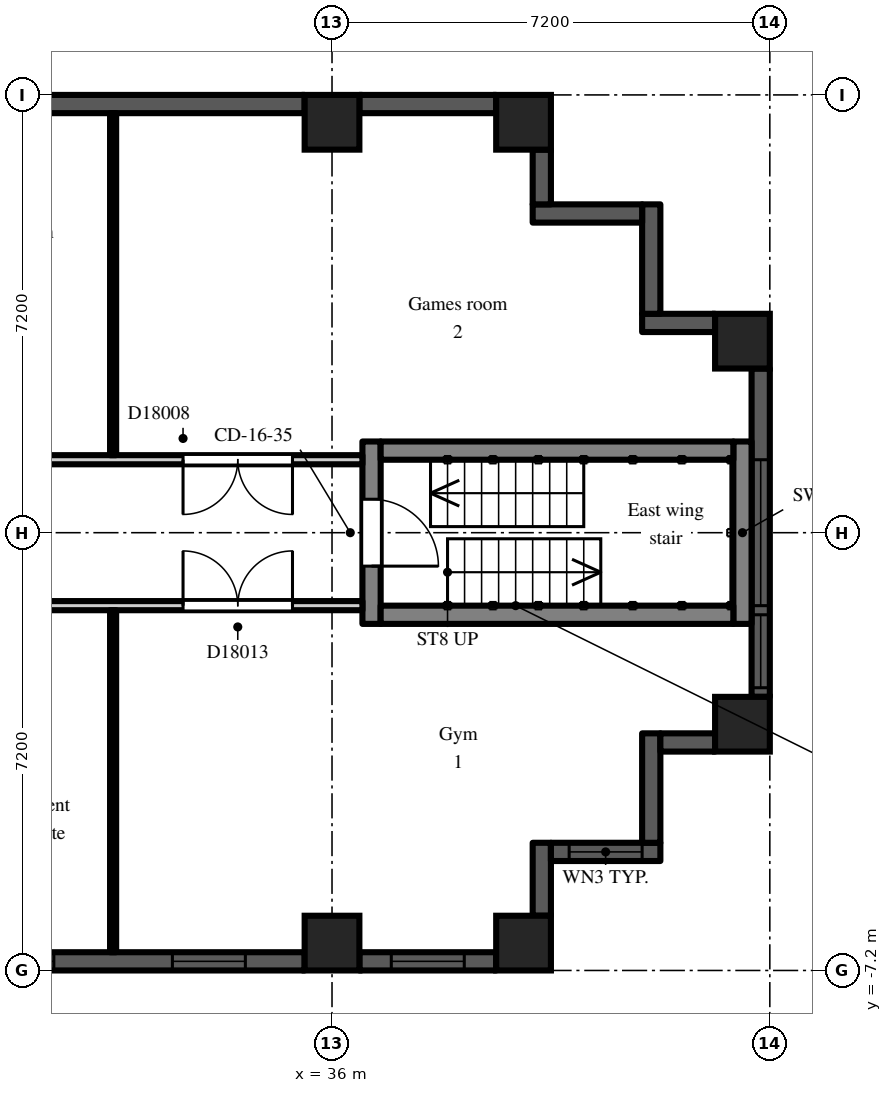
"""IFC4 building model, lengths in metres.
Left out: names, types, materials, properties, quantities, classifications, styles, units other than length and angle.
Written with IfcOpenShell. Run it as: python <this file> out.ifc"""

import sys

from ifc_helpers import new_model, si_unit, direction, frame, frame_2d, origin, origin_2d, place, context, subcontext, project, spatial, rectangle, extrude, element, fill, save


model = new_model("IFC4")
c1 = context("Model", 3, precision=1e-05, world=origin(), true_north=direction((0.0, 1.0)))
c2 = subcontext(c1, "Body", "Model", "MODEL_VIEW")
j1 = project(units=[si_unit("LENGTHUNIT", "METRE"), si_unit("PLANEANGLEUNIT", "RADIAN")], contexts=[c1])
p1 = place(None, origin())
s1 = spatial("IfcSite", under=j1, at=p1, CompositionType="ELEMENT")
p2 = place(p1, origin())
s2 = spatial("IfcBuilding", under=s1, at=p2, CompositionType="ELEMENT")
p3 = place(p2, frame((0.0, 0.0, 123.3)))
s3 = spatial("IfcBuildingStorey", under=s2, at=p3, CompositionType="ELEMENT", Elevation=123.3)
for number, where, z_axis, x_axis in (
    (1, (36.0, -6.75, 0.0), (0.0, 0.0, 1.0), (1.0, 0.0, 0.0)),
    (2, (36.0, 6.75, 0.0), (0.0, 0.0, 1.0), (1.0, 0.0, 0.0)),
    (3, (39.15, -6.75, 0.0), (0.0, 0.0, 1.0), (1.0, 0.0, 0.0)),
    (4, (39.15, 6.75, 0.0), (0.0, 0.0, 1.0), (1.0, 0.0, 0.0)),
    (5, (42.75, -3.15, 0.0), (0.0, 0.0, 1.0), (1.0, 0.0, 0.0)),
    (6, (42.75, 3.15, 0.0), (0.0, 0.0, 1.0), (1.0, 0.0, 0.0)),
):
    element("IfcColumn", number, at=place(p3, frame(where, z_axis=z_axis, x_axis=x_axis)), inside=s3, PredefinedType="COLUMN", context=c2, shape_type="SweptSolid", body=[
        extrude(rectangle(XDim=0.9, YDim=0.9, at=origin_2d()), origin(), (0.0, 0.0, 1.0), 3.0),
    ])
p4 = place(p3, frame((29.25, -7.05, 0.0), z_axis=(0.0, 0.0, 1.0), x_axis=(1.0, 0.0, 0.0)))
e7 = element("IfcWall", 7, at=p4, inside=s3, PredefinedType="SOLIDWALL", context=c2, shape_type="SweptSolid", body=[
    extrude(rectangle(XDim=6.3, YDim=0.3, at=frame_2d((3.15, 0.0))), origin(), (0.0, 0.0, 1.0), 2.2),
])
p5 = place(p4, frame((0.975, 0.0, 0.2)))
e8 = element("IfcOpeningElement", 8, at=p5, cuts=e7, PredefinedType="OPENING", context=c2, shape_type="SweptSolid", body=[
    extrude(rectangle(XDim=1.2, YDim=1.85, at=frame_2d((0.6, 0.925))), frame((0.0, 0.16, 0.0), z_axis=(0.0, -1.0, 0.0), x_axis=(1.0, 0.0, 0.0)), (0.0, 0.0, 1.0), 0.32),
])
p6 = place(p4, frame((4.125, 0.0, 0.2)))
e9 = element("IfcOpeningElement", 9, at=p6, cuts=e7, PredefinedType="OPENING", context=c2, shape_type="SweptSolid", body=[
    extrude(rectangle(XDim=1.2, YDim=1.85, at=frame_2d((0.6, 0.925))), frame((0.0, 0.16, 0.0), z_axis=(0.0, -1.0, 0.0), x_axis=(1.0, 0.0, 0.0)), (0.0, 0.0, 1.0), 0.32),
])
p7 = place(p3, frame((36.45, -7.05, 0.0), z_axis=(0.0, 0.0, 1.0), x_axis=(1.0, 0.0, 0.0)))
e10 = element("IfcWall", 10, at=p7, inside=s3, PredefinedType="SOLIDWALL", context=c2, shape_type="SweptSolid", body=[
    extrude(rectangle(XDim=2.25, YDim=0.3, at=frame_2d((1.125, 0.0))), origin(), (0.0, 0.0, 1.0), 2.2),
])
p8 = place(p7, frame((0.525, 0.0, 0.2)))
e11 = element("IfcOpeningElement", 11, at=p8, cuts=e10, PredefinedType="OPENING", context=c2, shape_type="SweptSolid", body=[
    extrude(rectangle(XDim=1.2, YDim=1.85, at=frame_2d((0.6, 0.925))), frame((0.0, 0.16, 0.0), z_axis=(0.0, -1.0, 0.0), x_axis=(1.0, 0.0, 0.0)), (0.0, 0.0, 1.0), 0.32),
])
p9 = place(p3, frame((39.45, -6.3, 0.0), z_axis=(0.0, 0.0, 1.0), x_axis=(0.0, 1.0, 0.0)))
e12 = element("IfcWall", 12, at=p9, inside=s3, PredefinedType="SOLIDWALL", context=c2, shape_type="SweptSolid", body=[
    extrude(rectangle(XDim=1.2, YDim=0.3, at=frame_2d((0.6, 0.0))), origin(), (0.0, 0.0, 1.0), 2.6),
])
p10 = place(p3, frame((39.6, -5.25, 0.0), z_axis=(0.0, 0.0, 1.0), x_axis=(1.0, 0.0, 0.0)))
e13 = element("IfcWall", 13, at=p10, inside=s3, PredefinedType="SOLIDWALL", context=c2, shape_type="SweptSolid", body=[
    extrude(rectangle(XDim=1.8, YDim=0.3, at=frame_2d((0.9, 0.0))), origin(), (0.0, 0.0, 1.0), 2.6),
])
p11 = place(p10, frame((0.3, 0.0, 0.2)))
e14 = element("IfcOpeningElement", 14, at=p11, cuts=e13, PredefinedType="OPENING", context=c2, shape_type="SweptSolid", body=[
    extrude(rectangle(XDim=1.2, YDim=1.85, at=frame_2d((0.6, 0.925))), frame((0.0, 0.16, 0.0), z_axis=(0.0, -1.0, 0.0), x_axis=(1.0, 0.0, 0.0)), (0.0, 0.0, 1.0), 0.32),
])
p12 = place(p3, frame((41.25, -5.1, 0.0), z_axis=(0.0, 0.0, 1.0), x_axis=(0.0, 1.0, 0.0)))
e15 = element("IfcWall", 15, at=p12, inside=s3, PredefinedType="SOLIDWALL", context=c2, shape_type="SweptSolid", body=[
    extrude(rectangle(XDim=1.8, YDim=0.3, at=frame_2d((0.9, 0.0))), origin(), (0.0, 0.0, 1.0), 2.6),
])
p13 = place(p3, frame((41.4, -3.45, 0.0), z_axis=(0.0, 0.0, 1.0), x_axis=(1.0, 0.0, 0.0)))
e16 = element("IfcWall", 16, at=p13, inside=s3, PredefinedType="SOLIDWALL", context=c2, shape_type="SweptSolid", body=[
    extrude(rectangle(XDim=0.9, YDim=0.3, at=frame_2d((0.45, 0.0))), origin(), (0.0, 0.0, 1.0), 2.6),
])
p14 = place(p3, frame((43.05, -2.7, 0.0), z_axis=(0.0, 0.0, 1.0), x_axis=(0.0, 1.0, 0.0)))
e17 = element("IfcWall", 17, at=p14, inside=s3, PredefinedType="SOLIDWALL", context=c2, shape_type="SweptSolid", body=[
    extrude(rectangle(XDim=5.4, YDim=0.3, at=frame_2d((2.7, 0.0))), origin(), (0.0, 0.0, 1.0), 2.2),
])
p15 = place(p14, frame((1.5, 0.0, 0.2)))
e18 = element("IfcOpeningElement", 18, at=p15, cuts=e17, PredefinedType="OPENING", context=c2, shape_type="SweptSolid", body=[
    extrude(rectangle(XDim=2.4, YDim=1.85, at=frame_2d((1.2, 0.925))), frame((0.0, 0.16, 0.0), z_axis=(0.0, -1.0, 0.0), x_axis=(1.0, 0.0, 0.0)), (0.0, 0.0, 1.0), 0.32),
])
p16 = place(p14, frame((0.15, 0.0, 0.2)))
e19 = element("IfcOpeningElement", 19, at=p16, cuts=e17, PredefinedType="OPENING", context=c2, shape_type="SweptSolid", body=[
    extrude(rectangle(XDim=1.2, YDim=1.85, at=frame_2d((0.6, 0.925))), frame((0.0, 0.16, 0.0), z_axis=(0.0, -1.0, 0.0), x_axis=(1.0, 0.0, 0.0)), (0.0, 0.0, 1.0), 0.32),
])
p17 = place(p3, frame((42.3, 3.45, 0.0), z_axis=(0.0, 0.0, 1.0), x_axis=(-1.0, 0.0, 0.0)))
e20 = element("IfcWall", 20, at=p17, inside=s3, PredefinedType="SOLIDWALL", context=c2, shape_type="SweptSolid", body=[
    extrude(rectangle(XDim=1.2, YDim=0.3, at=frame_2d((0.6, 0.0))), origin(), (0.0, 0.0, 1.0), 2.6),
])
p18 = place(p3, frame((41.25, 3.6, 0.0), z_axis=(0.0, 0.0, 1.0), x_axis=(0.0, 1.0, 0.0)))
e21 = element("IfcWall", 21, at=p18, inside=s3, PredefinedType="SOLIDWALL", context=c2, shape_type="SweptSolid", body=[
    extrude(rectangle(XDim=1.8, YDim=0.3, at=frame_2d((0.9, 0.0))), origin(), (0.0, 0.0, 1.0), 2.6),
])
p19 = place(p3, frame((41.1, 5.25, 0.0), z_axis=(0.0, 0.0, 1.0), x_axis=(-1.0, 0.0, 0.0)))
e22 = element("IfcWall", 22, at=p19, inside=s3, PredefinedType="SOLIDWALL", context=c2, shape_type="SweptSolid", body=[
    extrude(rectangle(XDim=1.8, YDim=0.3, at=frame_2d((0.9, 0.0))), origin(), (0.0, 0.0, 1.0), 2.6),
])
p20 = place(p3, frame((39.45, 5.4, 0.0), z_axis=(0.0, 0.0, 1.0), x_axis=(0.0, 1.0, 0.0)))
e23 = element("IfcWall", 23, at=p20, inside=s3, PredefinedType="SOLIDWALL", context=c2, shape_type="SweptSolid", body=[
    extrude(rectangle(XDim=0.9, YDim=0.3, at=frame_2d((0.45, 0.0))), origin(), (0.0, 0.0, 1.0), 2.6),
])
p21 = place(p3, frame((38.7, 7.05, 0.0), z_axis=(0.0, 0.0, 1.0), x_axis=(-1.0, 0.0, 0.0)))
e24 = element("IfcWall", 24, at=p21, inside=s3, PredefinedType="SOLIDWALL", context=c2, shape_type="SweptSolid", body=[
    extrude(rectangle(XDim=2.25, YDim=0.3, at=frame_2d((1.125, 0.0))), origin(), (0.0, 0.0, 1.0), 2.2),
])
p22 = place(p3, frame((35.55, 7.05, 0.0), z_axis=(0.0, 0.0, 1.0), x_axis=(-1.0, 0.0, 0.0)))
e25 = element("IfcWall", 25, at=p22, inside=s3, PredefinedType="SOLIDWALL", context=c2, shape_type="SweptSolid", body=[
    extrude(rectangle(XDim=6.3, YDim=0.3, at=frame_2d((3.15, 0.0))), origin(), (0.0, 0.0, 1.0), 2.2),
])
p23 = place(p3, frame((36.65, -1.5, 0.0), z_axis=(0.0, 0.0, 1.0), x_axis=(0.0, 1.0, 0.0)))
e26 = element("IfcWall", 26, at=p23, inside=s3, PredefinedType="SHEAR", context=c2, shape_type="SweptSolid", body=[
    extrude(rectangle(XDim=3.0, YDim=0.3, at=frame_2d((1.5, 0.0))), origin(), (0.0, 0.0, 1.0), 2.6),
])
p24 = place(p23, frame((0.95, 0.0, 0.0)))
e27 = element("IfcOpeningElement", 27, at=p24, cuts=e26, PredefinedType="OPENING", context=c2, shape_type="SweptSolid", body=[
    extrude(rectangle(XDim=1.1, YDim=2.1, at=frame_2d((0.55, 1.05))), frame((0.0, 0.16, 0.0), z_axis=(0.0, -1.0, 0.0), x_axis=(1.0, 0.0, 0.0)), (0.0, 0.0, 1.0), 0.32),
])
p25 = place(p3, frame((42.75, -1.5, 0.0), z_axis=(0.0, 0.0, 1.0), x_axis=(0.0, 1.0, 0.0)))
e28 = element("IfcWall", 28, at=p25, inside=s3, PredefinedType="SHEAR", context=c2, shape_type="SweptSolid", body=[
    extrude(rectangle(XDim=3.0, YDim=0.3, at=frame_2d((1.5, 0.0))), origin(), (0.0, 0.0, 1.0), 2.6),
])
for number, where, z_axis, x_axis in (
    (29, (36.8, -1.35, 0.0), (0.0, 0.0, 1.0), (1.0, 0.0, 0.0)),
    (30, (36.8, 1.35, 0.0), (0.0, 0.0, 1.0), (1.0, 0.0, 0.0)),
):
    element("IfcWall", number, at=place(p3, frame(where, z_axis=z_axis, x_axis=x_axis)), inside=s3, PredefinedType="SHEAR", context=c2, shape_type="SweptSolid", body=[
        extrude(rectangle(XDim=5.8, YDim=0.3, at=frame_2d((2.9, 0.0))), origin(), (0.0, 0.0, 1.0), 2.6),
    ])
p26 = place(p3, frame((21.6, -1.2, 0.0), z_axis=(0.0, 0.0, 1.0), x_axis=(1.0, 0.0, 0.0)))
e31 = element("IfcWall", 31, at=p26, inside=s3, PredefinedType="PARTITIONING", context=c2, shape_type="SweptSolid", body=[
    extrude(rectangle(XDim=14.9, YDim=0.15, at=frame_2d((7.45, 0.0))), origin(), (0.0, 0.0, 1.0), 2.6),
])
p27 = place(p26, frame((0.45, 0.0, 0.0)))
e32 = element("IfcOpeningElement", 32, at=p27, cuts=e31, PredefinedType="OPENING", context=c2, shape_type="SweptSolid", body=[
    extrude(rectangle(XDim=0.9, YDim=2.1, at=frame_2d((0.45, 1.05))), frame((0.0, 0.085, 0.0), z_axis=(0.0, -1.0, 0.0), x_axis=(1.0, 0.0, 0.0)), (0.0, 0.0, 1.0), 0.17),
])
p28 = place(p26, frame((2.25, 0.0, 0.0)))
e33 = element("IfcOpeningElement", 33, at=p28, cuts=e31, PredefinedType="OPENING", context=c2, shape_type="SweptSolid", body=[
    extrude(rectangle(XDim=0.9, YDim=2.1, at=frame_2d((0.45, 1.05))), frame((0.0, 0.085, 0.0), z_axis=(0.0, -1.0, 0.0), x_axis=(1.0, 0.0, 0.0)), (0.0, 0.0, 1.0), 0.17),
])
p29 = place(p26, frame((5.71, 0.0, 0.0)))
e34 = element("IfcOpeningElement", 34, at=p29, cuts=e31, PredefinedType="OPENING", context=c2, shape_type="SweptSolid", body=[
    extrude(rectangle(XDim=1.0, YDim=2.1, at=frame_2d((0.5, 1.05))), frame((0.0, 0.085, 0.0), z_axis=(0.0, -1.0, 0.0), x_axis=(1.0, 0.0, 0.0)), (0.0, 0.0, 1.0), 0.17),
])
p30 = place(p26, frame((11.95, 0.0, 0.0)))
e35 = element("IfcOpeningElement", 35, at=p30, cuts=e31, PredefinedType="OPENING", context=c2, shape_type="SweptSolid", body=[
    extrude(rectangle(XDim=1.8, YDim=2.1, at=frame_2d((0.9, 1.05))), frame((0.0, 0.085, 0.0), z_axis=(0.0, -1.0, 0.0), x_axis=(1.0, 0.0, 0.0)), (0.0, 0.0, 1.0), 0.17),
])
p31 = place(p3, frame((21.6, 1.2, 0.0), z_axis=(0.0, 0.0, 1.0), x_axis=(1.0, 0.0, 0.0)))
e36 = element("IfcWall", 36, at=p31, inside=s3, PredefinedType="PARTITIONING", context=c2, shape_type="SweptSolid", body=[
    extrude(rectangle(XDim=14.9, YDim=0.15, at=frame_2d((7.45, 0.0))), origin(), (0.0, 0.0, 1.0), 2.6),
])
p32 = place(p31, frame((0.45, 0.0, 0.0)))
e37 = element("IfcOpeningElement", 37, at=p32, cuts=e36, PredefinedType="OPENING", context=c2, shape_type="SweptSolid", body=[
    extrude(rectangle(XDim=0.9, YDim=2.1, at=frame_2d((0.45, 1.05))), frame((0.0, 0.085, 0.0), z_axis=(0.0, -1.0, 0.0), x_axis=(1.0, 0.0, 0.0)), (0.0, 0.0, 1.0), 0.17),
])
p33 = place(p31, frame((2.25, 0.0, 0.0)))
e38 = element("IfcOpeningElement", 38, at=p33, cuts=e36, PredefinedType="OPENING", context=c2, shape_type="SweptSolid", body=[
    extrude(rectangle(XDim=0.9, YDim=2.1, at=frame_2d((0.45, 1.05))), frame((0.0, 0.085, 0.0), z_axis=(0.0, -1.0, 0.0), x_axis=(1.0, 0.0, 0.0)), (0.0, 0.0, 1.0), 0.17),
])
p34 = place(p31, frame((6.3, 0.0, 0.0)))
e39 = element("IfcOpeningElement", 39, at=p34, cuts=e36, PredefinedType="OPENING", context=c2, shape_type="SweptSolid", body=[
    extrude(rectangle(XDim=1.8, YDim=2.1, at=frame_2d((0.9, 1.05))), frame((0.0, 0.085, 0.0), z_axis=(0.0, -1.0, 0.0), x_axis=(1.0, 0.0, 0.0)), (0.0, 0.0, 1.0), 0.17),
])
p35 = place(p31, frame((11.95, 0.0, 0.0)))
e40 = element("IfcOpeningElement", 40, at=p35, cuts=e36, PredefinedType="OPENING", context=c2, shape_type="SweptSolid", body=[
    extrude(rectangle(XDim=1.8, YDim=2.1, at=frame_2d((0.9, 1.05))), frame((0.0, 0.085, 0.0), z_axis=(0.0, -1.0, 0.0), x_axis=(1.0, 0.0, 0.0)), (0.0, 0.0, 1.0), 0.17),
])
for number, where, z_axis, x_axis in (
    (41, (32.4, -6.9, 0.0), (0.0, 0.0, 1.0), (0.0, 1.0, 0.0)),
    (42, (32.4, 1.275, 0.0), (0.0, 0.0, 1.0), (0.0, 1.0, 0.0)),
):
    element("IfcWall", number, at=place(p3, frame(where, z_axis=z_axis, x_axis=x_axis)), inside=s3, PredefinedType="PARTITIONING", context=c2, shape_type="SweptSolid", body=[
        extrude(rectangle(XDim=5.625, YDim=0.1, at=frame_2d((2.812, 0.0))), origin(), (0.0, 0.0, 1.0), 2.6),
    ])
p36 = place(p5, origin())
e43 = element("IfcWindow", 43, at=p36, inside=s3, PartitioningType="SINGLE_PANEL", PredefinedType="WINDOW", context=c2, shape_type="SweptSolid", body=[
    extrude(rectangle(XDim=1.2, YDim=1.85, at=frame_2d((0.6, 0.925))), frame((0.0, 0.03, 0.0), z_axis=(0.0, -1.0, 0.0), x_axis=(1.0, 0.0, 0.0)), (0.0, 0.0, 1.0), 0.06),
])
fill(e8, e43)
p37 = place(p6, origin())
e44 = element("IfcWindow", 44, at=p37, inside=s3, PartitioningType="SINGLE_PANEL", PredefinedType="WINDOW", context=c2, shape_type="SweptSolid", body=[
    extrude(rectangle(XDim=1.2, YDim=1.85, at=frame_2d((0.6, 0.925))), frame((0.0, 0.03, 0.0), z_axis=(0.0, -1.0, 0.0), x_axis=(1.0, 0.0, 0.0)), (0.0, 0.0, 1.0), 0.06),
])
fill(e9, e44)
p38 = place(p8, origin())
e45 = element("IfcWindow", 45, at=p38, inside=s3, PartitioningType="SINGLE_PANEL", PredefinedType="WINDOW", context=c2, shape_type="SweptSolid", body=[
    extrude(rectangle(XDim=1.2, YDim=1.85, at=frame_2d((0.6, 0.925))), frame((0.0, 0.03, 0.0), z_axis=(0.0, -1.0, 0.0), x_axis=(1.0, 0.0, 0.0)), (0.0, 0.0, 1.0), 0.06),
])
fill(e11, e45)
p39 = place(p11, origin())
e46 = element("IfcWindow", 46, at=p39, inside=s3, PartitioningType="SINGLE_PANEL", PredefinedType="WINDOW", context=c2, shape_type="SweptSolid", body=[
    extrude(rectangle(XDim=1.2, YDim=1.85, at=frame_2d((0.6, 0.925))), frame((0.0, 0.03, 0.0), z_axis=(0.0, -1.0, 0.0), x_axis=(1.0, 0.0, 0.0)), (0.0, 0.0, 1.0), 0.06),
])
fill(e14, e46)
p40 = place(p15, origin())
e47 = element("IfcWindow", 47, at=p40, inside=s3, PartitioningType="SINGLE_PANEL", PredefinedType="WINDOW", context=c2, shape_type="SweptSolid", body=[
    extrude(rectangle(XDim=2.4, YDim=1.85, at=frame_2d((1.2, 0.925))), frame((0.0, 0.03, 0.0), z_axis=(0.0, -1.0, 0.0), x_axis=(1.0, 0.0, 0.0)), (0.0, 0.0, 1.0), 0.06),
])
fill(e18, e47)
p41 = place(p16, origin())
e48 = element("IfcWindow", 48, at=p41, inside=s3, PartitioningType="SINGLE_PANEL", PredefinedType="WINDOW", context=c2, shape_type="SweptSolid", body=[
    extrude(rectangle(XDim=1.2, YDim=1.85, at=frame_2d((0.6, 0.925))), frame((0.0, 0.03, 0.0), z_axis=(0.0, -1.0, 0.0), x_axis=(1.0, 0.0, 0.0)), (0.0, 0.0, 1.0), 0.06),
])
fill(e19, e48)
p42 = place(p24, frame((1.1, 0.0, 0.0), z_axis=(0.0, 0.0, 1.0), x_axis=(-1.0, 0.0, 0.0)))
e49 = element("IfcDoor", 49, at=p42, inside=s3, OperationType="SINGLE_SWING_RIGHT", PredefinedType="DOOR", context=c2, shape_type="SweptSolid", body=[
    extrude(rectangle(XDim=1.1, YDim=2.1, at=frame_2d((0.55, 1.05))), frame((0.0, 0.025, 0.0), z_axis=(0.0, -1.0, 0.0), x_axis=(1.0, 0.0, 0.0)), (0.0, 0.0, 1.0), 0.05),
])
fill(e27, e49)
p43 = place(p35, frame((1.8, 0.0, 0.0), z_axis=(0.0, 0.0, 1.0), x_axis=(-1.0, 0.0, 0.0)))
e50 = element("IfcDoor", 50, at=p43, inside=s3, OperationType="DOUBLE_DOOR_DOUBLE_SWING", PredefinedType="DOOR", context=c2, shape_type="SweptSolid", body=[
    extrude(rectangle(XDim=1.8, YDim=2.1, at=frame_2d((0.9, 1.05))), frame((0.0, 0.025, 0.0), z_axis=(0.0, -1.0, 0.0), x_axis=(1.0, 0.0, 0.0)), (0.0, 0.0, 1.0), 0.05),
])
fill(e40, e50)
p44 = place(p30, origin())
e51 = element("IfcDoor", 51, at=p44, inside=s3, OperationType="DOUBLE_DOOR_DOUBLE_SWING", PredefinedType="DOOR", context=c2, shape_type="SweptSolid", body=[
    extrude(rectangle(XDim=1.8, YDim=2.1, at=frame_2d((0.9, 1.05))), frame((0.0, 0.025, 0.0), z_axis=(0.0, -1.0, 0.0), x_axis=(1.0, 0.0, 0.0)), (0.0, 0.0, 1.0), 0.05),
])
fill(e35, e51)
save(model, sys.argv[1])
